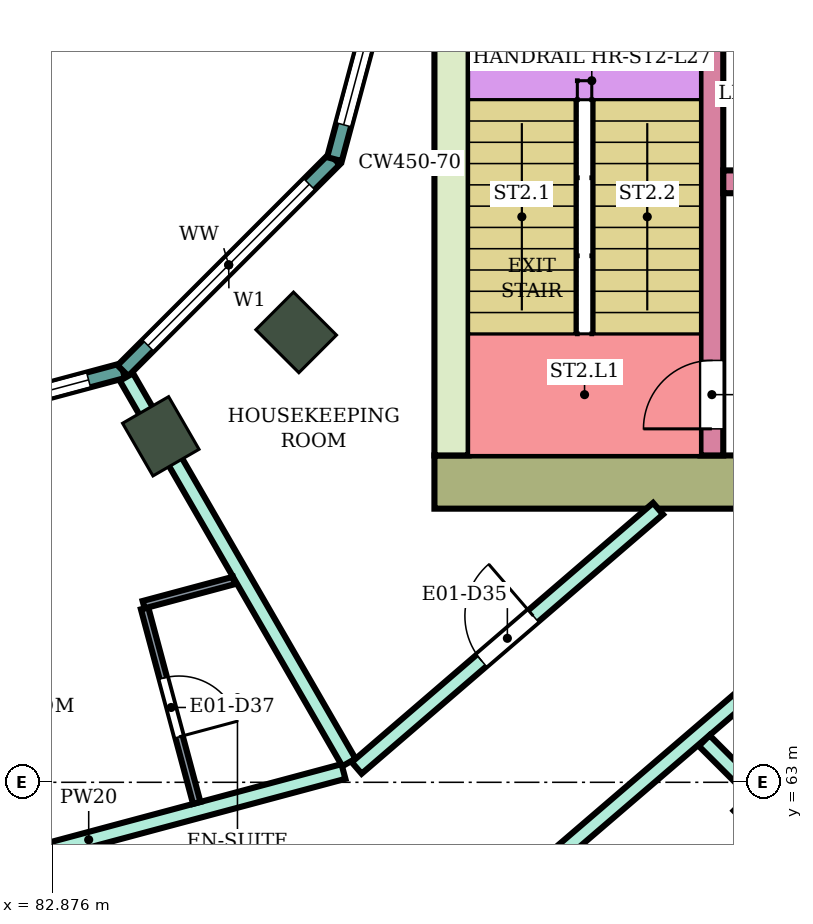
"""IFC4 building model, lengths in metres.
Left out: names, types, materials, properties, quantities, classifications, styles, units other than length and angle.
Written with IfcOpenShell. Run it as: python <this file> out.ifc"""

import sys

from ifc_helpers import new_model, si_unit, direction, frame, frame_2d, origin, origin_2d, place, context, subcontext, project, spatial, rectangle, extrude, element, fill, save


model = new_model("IFC4")
c1 = context("Model", 3, precision=1e-05, world=origin(), true_north=direction((0.0, 1.0)))
c2 = subcontext(c1, "Body", "Model", "MODEL_VIEW")
j1 = project(units=[si_unit("LENGTHUNIT", "METRE"), si_unit("PLANEANGLEUNIT", "RADIAN")], contexts=[c1])
p1 = place(None, origin())
s1 = spatial("IfcSite", under=j1, at=p1, CompositionType="ELEMENT")
p2 = place(p1, origin())
s2 = spatial("IfcBuilding", under=s1, at=p2, CompositionType="ELEMENT")
p3 = place(p2, frame((0.0, 0.0, 118.5)))
s3 = spatial("IfcBuildingStorey", under=s2, at=p3, CompositionType="ELEMENT", Elevation=118.5)
p4 = place(p3, frame((92.445, 62.555, 0.0), z_axis=(0.0, 0.0, 1.0), x_axis=(0.707106781187, -0.707106781187, 0.0)))
e1 = element("IfcColumn", 1, at=p4, inside=s3, PredefinedType="COLUMN", context=c2, shape_type="SweptSolid", body=[
    extrude(rectangle(XDim=1.0, YDim=0.8, at=origin_2d()), origin(), (0.0, 0.0, 1.0), 3.9),
])
for number, where, z_axis, x_axis in (
    (2, (84.3, 67.552, 0.0), (0.0, 0.0, 1.0), (0.5, -0.866, 0.0)),
    (3, (86.081, 68.919, 0.0), (0.0, 0.0, 1.0), (0.707, -0.707, 0.0)),
):
    element("IfcColumn", number, at=place(p3, frame(where, z_axis=z_axis, x_axis=x_axis)), inside=s3, PredefinedType="COLUMN", context=c2, shape_type="SweptSolid", body=[
        extrude(rectangle(XDim=0.8, YDim=0.7, at=origin_2d()), origin(), (0.0, 0.0, 1.0), 3.9),
    ])
p5 = place(p3, frame((87.9, 66.95, 0.0), z_axis=(0.0, 0.0, 1.0), x_axis=(1.0, 0.0, 0.0)))
e4 = element("IfcWall", 4, at=p5, inside=s3, PredefinedType="SHEAR", context=c2, shape_type="SweptSolid", body=[
    extrude(rectangle(XDim=14.8, YDim=0.7, at=frame_2d((7.4, 0.0))), origin(), (0.0, 0.0, 1.0), 3.58),
])
p6 = place(p5, frame((4.2, 0.0, 0.0)))
e5 = element("IfcOpeningElement", 5, at=p6, cuts=e4, PredefinedType="OPENING", context=c2, shape_type="SweptSolid", body=[
    extrude(rectangle(XDim=2.4, YDim=2.4, at=frame_2d((1.2, 1.2))), frame((0.0, 0.36, 0.0), z_axis=(0.0, -1.0, 0.0), x_axis=(1.0, 0.0, 0.0)), (0.0, 0.0, 1.0), 0.72),
])
p7 = place(p3, frame((88.125, 67.3, 0.0), z_axis=(0.0, 0.0, 1.0), x_axis=(0.0, 1.0, 0.0)))
e6 = element("IfcWall", 6, at=p7, inside=s3, PredefinedType="SHEAR", context=c2, shape_type="SweptSolid", body=[
    extrude(rectangle(XDim=7.7, YDim=0.45, at=frame_2d((3.85, 0.0))), origin(), (0.0, 0.0, 1.0), 3.58),
])
p8 = place(p3, frame((91.55, 67.3, 0.0), z_axis=(0.0, 0.0, 1.0), x_axis=(0.0, 1.0, 0.0)))
e7 = element("IfcWall", 7, at=p8, inside=s3, PredefinedType="SHEAR", context=c2, shape_type="SweptSolid", body=[
    extrude(rectangle(XDim=7.7, YDim=0.3, at=frame_2d((3.85, 0.0))), origin(), (0.0, 0.0, 1.0), 3.58),
])
p9 = place(p8, frame((0.35, 0.0, 0.0)))
e8 = element("IfcOpeningElement", 8, at=p9, cuts=e7, PredefinedType="OPENING", context=c2, shape_type="SweptSolid", body=[
    extrude(rectangle(XDim=0.9, YDim=2.1, at=frame_2d((0.45, 1.05))), frame((0.0, 0.16, 0.0), z_axis=(0.0, -1.0, 0.0), x_axis=(1.0, 0.0, 0.0)), (0.0, 0.0, 1.0), 0.32),
])
p10 = place(p3, frame((91.7, 70.9, 0.0), z_axis=(0.0, 0.0, 1.0), x_axis=(1.0, 0.0, 0.0)))
e9 = element("IfcWall", 9, at=p10, inside=s3, PredefinedType="SHEAR", context=c2, shape_type="SweptSolid", body=[
    extrude(rectangle(XDim=11.0, YDim=0.3, at=frame_2d((5.5, 0.0))), origin(), (0.0, 0.0, 1.0), 3.58),
])
p11 = place(p10, frame((0.4, 0.0, 0.0)))
e10 = element("IfcOpeningElement", 10, at=p11, cuts=e9, PredefinedType="OPENING", context=c2, shape_type="SweptSolid", body=[
    extrude(rectangle(XDim=1.4, YDim=2.1, at=frame_2d((0.7, 1.05))), frame((0.0, 0.16, 0.0), z_axis=(0.0, -1.0, 0.0), x_axis=(1.0, 0.0, 0.0)), (0.0, 0.0, 1.0), 0.32),
])
p12 = place(p10, frame((5.4, 0.0, 0.0)))
e11 = element("IfcOpeningElement", 11, at=p12, cuts=e9, PredefinedType="OPENING", context=c2, shape_type="SweptSolid", body=[
    extrude(rectangle(XDim=1.4, YDim=2.1, at=frame_2d((0.7, 1.05))), frame((0.0, 0.16, 0.0), z_axis=(0.0, -1.0, 0.0), x_axis=(1.0, 0.0, 0.0)), (0.0, 0.0, 1.0), 0.32),
])
p13 = place(p10, frame((8.1, 0.0, 0.0)))
e12 = element("IfcOpeningElement", 12, at=p13, cuts=e9, PredefinedType="OPENING", context=c2, shape_type="SweptSolid", body=[
    extrude(rectangle(XDim=1.0, YDim=2.1, at=frame_2d((0.5, 1.05))), frame((0.0, 0.16, 0.0), z_axis=(0.0, -1.0, 0.0), x_axis=(1.0, 0.0, 0.0)), (0.0, 0.0, 1.0), 0.32),
])
p14 = place(p3, frame((80.0, 67.396, 0.0), z_axis=(0.0, 0.0, 1.0), x_axis=(0.965933654434, 0.258789828301, 0.0)))
e13 = element("IfcWall", 13, at=p14, inside=s3, PredefinedType="NOTDEFINED", context=c2, shape_type="SweptSolid", body=[
    extrude(rectangle(XDim=3.936, YDim=0.2, at=frame_2d((1.968, 0.0))), origin(), (0.0, 0.0, 1.0), 3.9),
])
p15 = place(p14, frame((0.468, 0.0, 0.9)))
e14 = element("IfcOpeningElement", 14, at=p15, cuts=e13, PredefinedType="OPENING", context=c2, shape_type="SweptSolid", body=[
    extrude(rectangle(XDim=3.0, YDim=2.3, at=frame_2d((1.5, 1.15))), frame((0.0, 0.11, 0.0), z_axis=(0.0, -1.0, 0.0), x_axis=(1.0, 0.0, 0.0)), (0.0, 0.0, 1.0), 0.22),
])
p16 = place(p3, frame((83.802, 68.415, 0.0), z_axis=(0.0, 0.0, 1.0), x_axis=(0.707106781187, 0.707106781187, 0.0)))
e15 = element("IfcWall", 15, at=p16, inside=s3, PredefinedType="NOTDEFINED", context=c2, shape_type="SweptSolid", body=[
    extrude(rectangle(XDim=3.936, YDim=0.2, at=frame_2d((1.968, 0.0))), origin(), (0.0, 0.0, 1.0), 3.9),
])
p17 = place(p16, frame((0.468, 0.0, 0.9)))
e16 = element("IfcOpeningElement", 16, at=p17, cuts=e15, PredefinedType="OPENING", context=c2, shape_type="SweptSolid", body=[
    extrude(rectangle(XDim=3.0, YDim=2.3, at=frame_2d((1.5, 1.15))), frame((0.0, 0.11, 0.0), z_axis=(0.0, -1.0, 0.0), x_axis=(1.0, 0.0, 0.0)), (0.0, 0.0, 1.0), 0.22),
])
p18 = place(p3, frame((86.585, 71.198, 0.0), z_axis=(0.0, 0.0, 1.0), x_axis=(0.258789828301, 0.965933654434, 0.0)))
e17 = element("IfcWall", 17, at=p18, inside=s3, PredefinedType="NOTDEFINED", context=c2, shape_type="SweptSolid", body=[
    extrude(rectangle(XDim=3.936, YDim=0.2, at=frame_2d((1.968, 0.0))), origin(), (0.0, 0.0, 1.0), 3.9),
])
p19 = place(p18, frame((0.468, 0.0, 0.9)))
e18 = element("IfcOpeningElement", 18, at=p19, cuts=e17, PredefinedType="OPENING", context=c2, shape_type="SweptSolid", body=[
    extrude(rectangle(XDim=3.0, YDim=2.3, at=frame_2d((1.5, 1.15))), frame((0.0, 0.11, 0.0), z_axis=(0.0, -1.0, 0.0), x_axis=(1.0, 0.0, 0.0)), (0.0, 0.0, 1.0), 0.22),
])
p20 = place(p3, frame((80.0, 61.346, 0.0), z_axis=(0.0, 0.0, 1.0), x_axis=(0.965924181808, 0.258825182312, 0.0)))
e19 = element("IfcWall", 19, at=p20, inside=s3, PredefinedType="PARTITIONING", context=c2, shape_type="SweptSolid", body=[
    extrude(rectangle(XDim=6.94, YDim=0.2, at=frame_2d((3.47, 0.0))), origin(), (0.0, 0.0, 1.0), 3.45),
])
p21 = place(p20, frame((0.55, 0.0, 0.0)))
e20 = element("IfcOpeningElement", 20, at=p21, cuts=e19, PredefinedType="OPENING", context=c2, shape_type="SweptSolid", body=[
    extrude(rectangle(XDim=1.0, YDim=2.1, at=frame_2d((0.5, 1.05))), frame((0.0, 0.11, 0.0), z_axis=(0.0, -1.0, 0.0), x_axis=(1.0, 0.0, 0.0)), (0.0, 0.0, 1.0), 0.22),
])
p22 = place(p3, frame((83.848, 68.332, 0.0), z_axis=(0.0, 0.0, 1.0), x_axis=(0.499933000352, -0.866064082594, 0.0)))
e21 = element("IfcWall", 21, at=p22, inside=s3, PredefinedType="PARTITIONING", context=c2, shape_type="SweptSolid", body=[
    extrude(rectangle(XDim=5.855, YDim=0.2, at=frame_2d((2.928, 0.0))), origin(), (0.0, 0.0, 1.0), 3.45),
])
p23 = place(p3, frame((86.877, 63.189, 0.0), z_axis=(0.0, 0.0, 1.0), x_axis=(0.758075808328, 0.652166442581, 0.0)))
e22 = element("IfcWall", 22, at=p23, inside=s3, PredefinedType="PARTITIONING", context=c2, shape_type="SweptSolid", body=[
    extrude(rectangle(XDim=5.23, YDim=0.2, at=frame_2d((2.615, 0.0))), origin(), (0.0, 0.0, 1.0), 3.45),
])
p24 = place(p23, frame((2.165, 0.0, 0.0)))
e23 = element("IfcOpeningElement", 23, at=p24, cuts=e22, PredefinedType="OPENING", context=c2, shape_type="SweptSolid", body=[
    extrude(rectangle(XDim=0.9, YDim=2.1, at=frame_2d((0.45, 1.05))), frame((0.0, 0.11, 0.0), z_axis=(0.0, -1.0, 0.0), x_axis=(1.0, 0.0, 0.0)), (0.0, 0.0, 1.0), 0.22),
])
p25 = place(p3, frame((88.235, 60.931, 0.0), z_axis=(0.0, 0.0, 1.0), x_axis=(0.758816241808, 0.651304775945, 0.0)))
e24 = element("IfcWall", 24, at=p25, inside=s3, PredefinedType="PARTITIONING", context=c2, shape_type="SweptSolid", body=[
    extrude(rectangle(XDim=6.186, YDim=0.2, at=frame_2d((3.093, 0.0))), origin(), (0.0, 0.0, 1.0), 3.45),
])
p26 = place(p25, frame((0.308, 0.0, 0.0)))
e25 = element("IfcOpeningElement", 25, at=p26, cuts=e24, PredefinedType="OPENING", context=c2, shape_type="SweptSolid", body=[
    extrude(rectangle(XDim=1.1, YDim=2.1, at=frame_2d((0.55, 1.05))), frame((0.0, 0.11, 0.0), z_axis=(0.0, -1.0, 0.0), x_axis=(1.0, 0.0, 0.0)), (0.0, 0.0, 1.0), 0.22),
])
p27 = place(p3, frame((91.449, 63.548, 0.0), z_axis=(0.0, 0.0, 1.0), x_axis=(0.706984804638, -0.707228736698, 0.0)))
e26 = element("IfcWall", 26, at=p27, inside=s3, PredefinedType="PARTITIONING", context=c2, shape_type="SweptSolid", body=[
    extrude(rectangle(XDim=7.006, YDim=0.2, at=frame_2d((3.503, 0.0))), origin(), (0.0, 0.0, 1.0), 3.45),
])
p28 = place(p3, frame((84.087, 65.289, 0.0), z_axis=(0.0, 0.0, 1.0), x_axis=(0.258929459649, -0.965896234037, 0.0)))
e27 = element("IfcWall", 27, at=p28, inside=s3, PredefinedType="PARTITIONING", context=c2, shape_type="SweptSolid", body=[
    extrude(rectangle(XDim=2.65, YDim=0.1, at=frame_2d((1.325, 0.0))), origin(), (0.0, 0.0, 1.0), 3.45),
])
p29 = place(p28, frame((0.95, 0.0, 0.0)))
e28 = element("IfcOpeningElement", 28, at=p29, cuts=e27, PredefinedType="OPENING", context=c2, shape_type="SweptSolid", body=[
    extrude(rectangle(XDim=0.8, YDim=2.1, at=frame_2d((0.4, 1.05))), frame((0.0, 0.06, 0.0), z_axis=(0.0, -1.0, 0.0), x_axis=(1.0, 0.0, 0.0)), (0.0, 0.0, 1.0), 0.12),
])
p30 = place(p3, frame((84.074, 65.337, 0.0), z_axis=(0.0, 0.0, 1.0), x_axis=(0.965914351064, 0.258861867428, 0.0)))
e29 = element("IfcWall", 29, at=p30, inside=s3, PredefinedType="PARTITIONING", context=c2, shape_type="SweptSolid", body=[
    extrude(rectangle(XDim=1.229, YDim=0.1, at=frame_2d((0.615, 0.0))), origin(), (0.0, 0.0, 1.0), 3.45),
])
p31 = place(p15, origin())
e30 = element("IfcWindow", 30, at=p31, inside=s3, PartitioningType="SINGLE_PANEL", PredefinedType="WINDOW", context=c2, shape_type="SweptSolid", body=[
    extrude(rectangle(XDim=3.0, YDim=2.3, at=frame_2d((1.5, 1.15))), frame((0.0, 0.03, 0.0), z_axis=(0.0, -1.0, 0.0), x_axis=(1.0, 0.0, 0.0)), (0.0, 0.0, 1.0), 0.06),
])
fill(e14, e30)
p32 = place(p17, origin())
e31 = element("IfcWindow", 31, at=p32, inside=s3, PartitioningType="SINGLE_PANEL", PredefinedType="WINDOW", context=c2, shape_type="SweptSolid", body=[
    extrude(rectangle(XDim=3.0, YDim=2.3, at=frame_2d((1.5, 1.15))), frame((0.0, 0.03, 0.0), z_axis=(0.0, -1.0, 0.0), x_axis=(1.0, 0.0, 0.0)), (0.0, 0.0, 1.0), 0.06),
])
fill(e16, e31)
p33 = place(p19, origin())
e32 = element("IfcWindow", 32, at=p33, inside=s3, PartitioningType="SINGLE_PANEL", PredefinedType="WINDOW", context=c2, shape_type="SweptSolid", body=[
    extrude(rectangle(XDim=3.0, YDim=2.3, at=frame_2d((1.5, 1.15))), frame((0.0, 0.03, 0.0), z_axis=(0.0, -1.0, 0.0), x_axis=(1.0, 0.0, 0.0)), (0.0, 0.0, 1.0), 0.06),
])
fill(e18, e32)
p34 = place(p24, origin())
e33 = element("IfcDoor", 33, at=p34, inside=s3, OperationType="SINGLE_SWING_RIGHT", PredefinedType="DOOR", context=c2, shape_type="SweptSolid", body=[
    extrude(rectangle(XDim=0.9, YDim=2.1, at=frame_2d((0.45, 1.05))), frame((0.0, 0.025, 0.0), z_axis=(0.0, -1.0, 0.0), x_axis=(1.0, 0.0, 0.0)), (0.0, 0.0, 1.0), 0.05),
])
fill(e23, e33)
p35 = place(p29, origin())
e34 = element("IfcDoor", 34, at=p35, inside=s3, OperationType="SINGLE_SWING_RIGHT", PredefinedType="DOOR", context=c2, shape_type="SweptSolid", body=[
    extrude(rectangle(XDim=0.8, YDim=2.1, at=frame_2d((0.4, 1.05))), frame((0.0, 0.025, 0.0), z_axis=(0.0, -1.0, 0.0), x_axis=(1.0, 0.0, 0.0)), (0.0, 0.0, 1.0), 0.05),
])
fill(e28, e34)
p36 = place(p9, origin())
e35 = element("IfcDoor", 35, at=p36, inside=s3, OperationType="SINGLE_SWING_LEFT", PredefinedType="DOOR", context=c2, shape_type="SweptSolid", body=[
    extrude(rectangle(XDim=0.9, YDim=2.1, at=frame_2d((0.45, 1.05))), frame((0.0, 0.025, 0.0), z_axis=(0.0, -1.0, 0.0), x_axis=(1.0, 0.0, 0.0)), (0.0, 0.0, 1.0), 0.05),
])
fill(e8, e35)
save(model, sys.argv[1])
